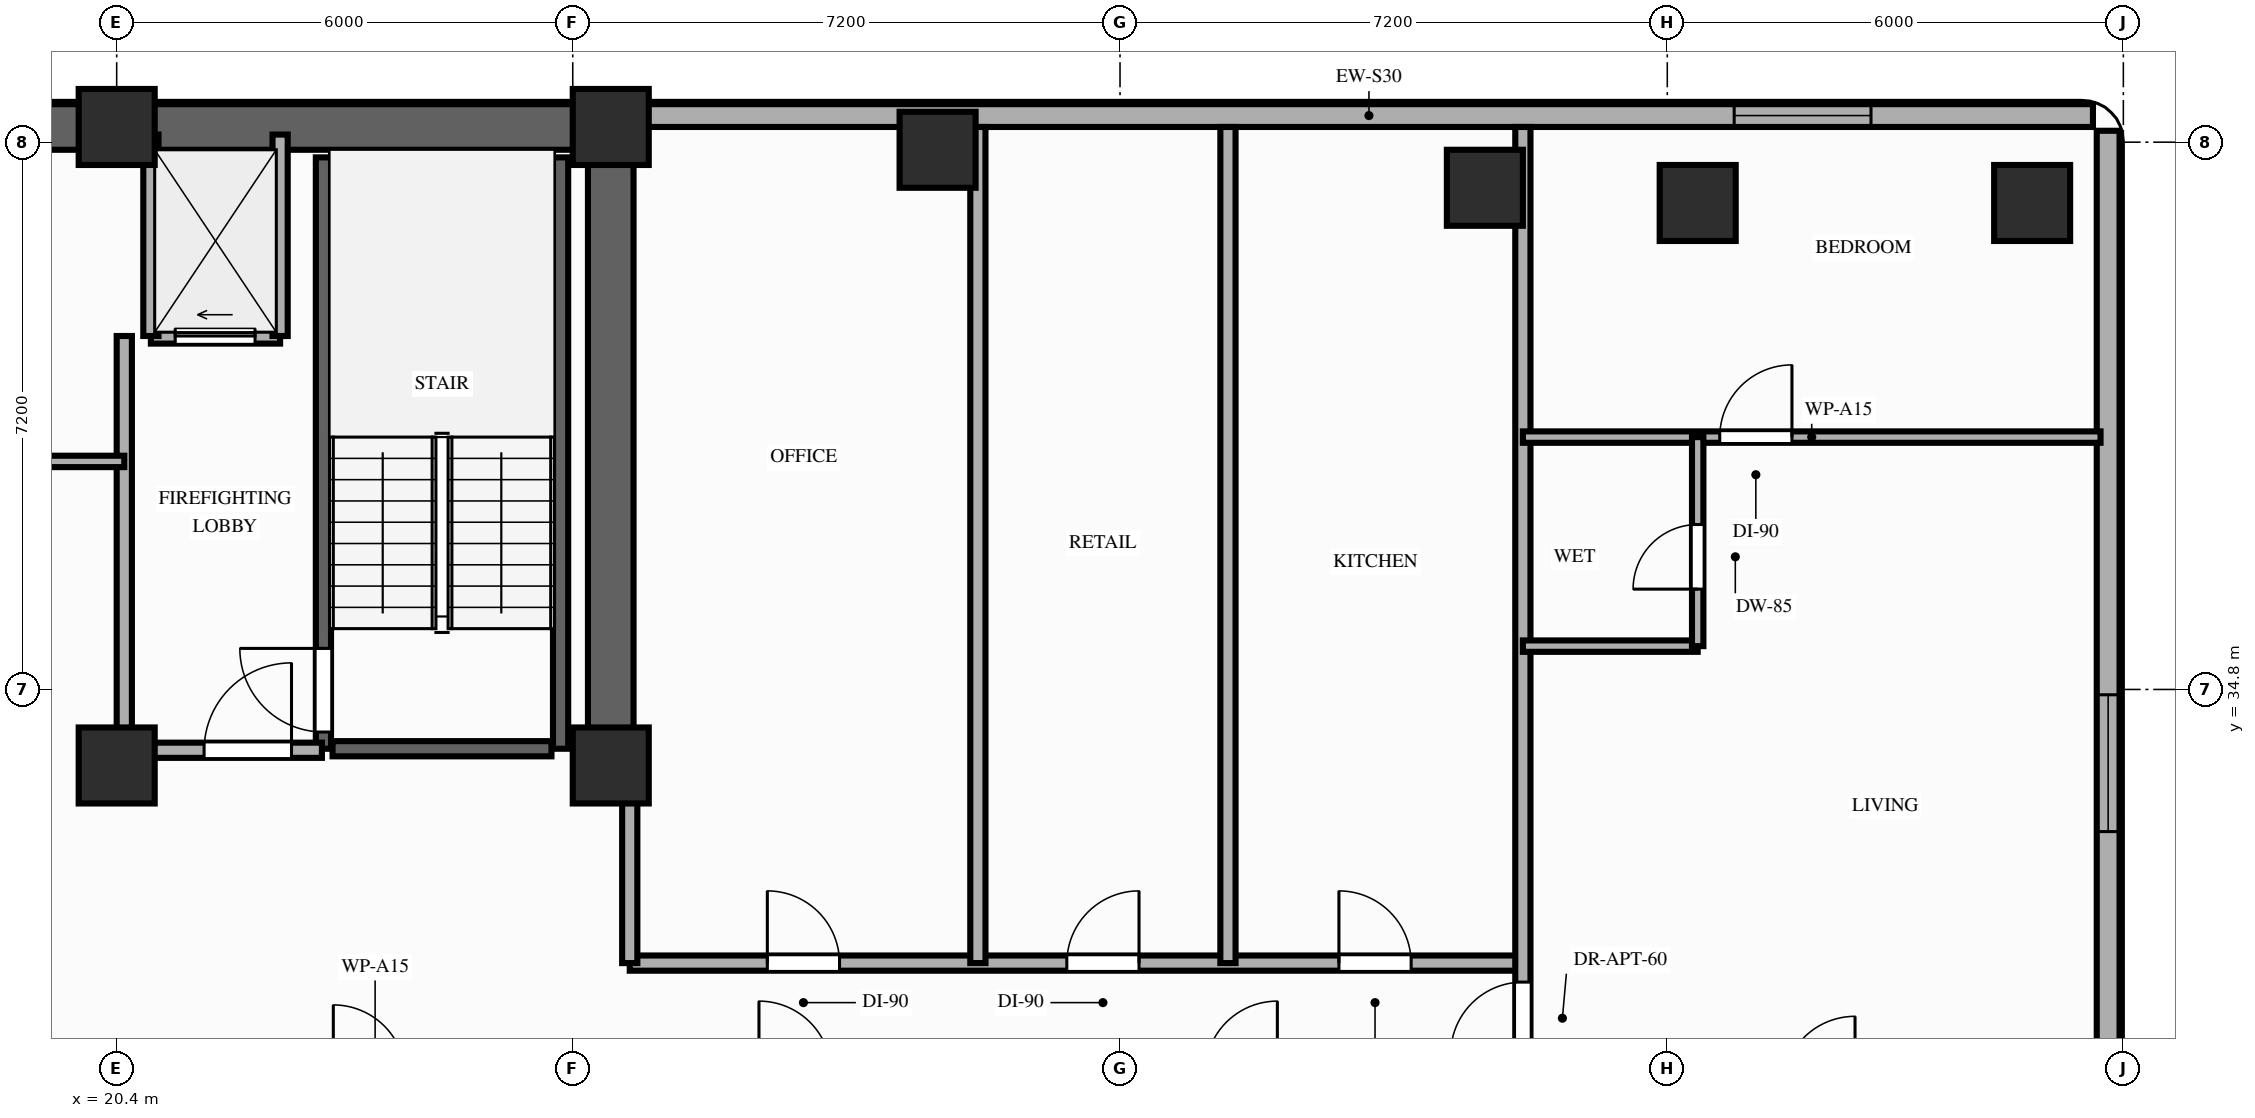
"""IFC4 building model, lengths in metres.
Left out: names, types, materials, properties, quantities, classifications, styles, units other than length and angle.
Written with IfcOpenShell. Run it as: python <this file> out.ifc"""

import sys

from ifc_helpers import new_model, si_unit, direction, frame, frame_2d, origin, origin_2d, place, context, subcontext, project, spatial, rectangle, extrude, element, fill, save


model = new_model("IFC4")
c1 = context("Model", 3, precision=1e-05, world=origin(), true_north=direction((0.0, 1.0)))
c2 = subcontext(c1, "Body", "Model", "MODEL_VIEW")
j1 = project(units=[si_unit("LENGTHUNIT", "METRE"), si_unit("PLANEANGLEUNIT", "RADIAN")], contexts=[c1])
p1 = place(None, origin())
s1 = spatial("IfcSite", under=j1, at=p1, CompositionType="ELEMENT")
p2 = place(p1, origin())
s2 = spatial("IfcBuilding", under=s1, at=p2, CompositionType="ELEMENT")
p3 = place(p2, frame((0.0, 0.0, 107.4)))
s3 = spatial("IfcBuildingStorey", under=s2, at=p3, CompositionType="ELEMENT", Elevation=107.4)
for number, where, z_axis, x_axis in (
    (1, (20.4, 33.8, 0.0), (0.0, 0.0, 1.0), (1.0, 0.0, 0.0)),
    (2, (26.9, 33.8, 0.0), (0.0, 0.0, 1.0), (1.0, 0.0, 0.0)),
    (3, (20.4, 42.2, 0.0), (0.0, 0.0, 1.0), (1.0, 0.0, 0.0)),
    (4, (26.9, 42.2, 0.0), (0.0, 0.0, 1.0), (1.0, 0.0, 0.0)),
    (5, (31.2, 41.9, 0.0), (0.0, 0.0, 1.0), (1.0, 0.0, 0.0)),
    (6, (38.4, 41.4, 0.0), (0.0, 0.0, 1.0), (1.0, 0.0, 0.0)),
    (7, (41.2, 41.2, 0.0), (0.0, 0.0, 1.0), (1.0, 0.0, 0.0)),
    (8, (45.6, 41.2, 0.0), (0.0, 0.0, 1.0), (1.0, 0.0, 0.0)),
):
    element("IfcColumn", number, at=place(p3, frame(where, z_axis=z_axis, x_axis=x_axis)), inside=s3, PredefinedType="COLUMN", context=c2, shape_type="SweptSolid", body=[
        extrude(rectangle(XDim=1.0, YDim=1.0, at=origin_2d()), origin(), (0.0, 0.0, 1.0), 3.2),
    ])
p4 = place(p3, frame((46.4, 42.35, 0.0), z_axis=(0.0, 0.0, 1.0), x_axis=(-1.0, 0.0, 0.0)))
e9 = element("IfcWall", 9, at=p4, inside=s3, PredefinedType="STANDARD", context=c2, shape_type="SweptSolid", body=[
    extrude(rectangle(XDim=19.05, YDim=0.3, at=frame_2d((9.525, 0.0))), origin(), (0.0, 0.0, 1.0), 2.41),
])
p5 = place(p4, frame((2.92, 0.0, 0.85)))
e10 = element("IfcOpeningElement", 10, at=p5, cuts=e9, PredefinedType="OPENING", context=c2, shape_type="SweptSolid", body=[
    extrude(rectangle(XDim=1.8, YDim=1.31, at=frame_2d((0.9, 0.655))), frame((0.0, 0.16, 0.0), z_axis=(0.0, -1.0, 0.0), x_axis=(1.0, 0.0, 0.0)), (0.0, 0.0, 1.0), 0.32),
])
p6 = place(p3, frame((46.6, 26.8, 0.0), z_axis=(0.0, 0.0, 1.0), x_axis=(0.0, 1.0, 0.0)))
e11 = element("IfcWall", 11, at=p6, inside=s3, PredefinedType="STANDARD", context=c2, shape_type="SweptSolid", body=[
    extrude(rectangle(XDim=15.35, YDim=0.3, at=frame_2d((7.675, 0.0))), origin(), (0.0, 0.0, 1.0), 3.02),
])
p7 = place(p6, frame((6.13, 0.0, 0.85)))
e12 = element("IfcOpeningElement", 12, at=p7, cuts=e11, PredefinedType="OPENING", context=c2, shape_type="SweptSolid", body=[
    extrude(rectangle(XDim=1.8, YDim=1.75, at=frame_2d((0.9, 0.875))), frame((0.0, 0.16, 0.0), z_axis=(0.0, -1.0, 0.0), x_axis=(1.0, 0.0, 0.0)), (0.0, 0.0, 1.0), 0.32),
])
p8 = place(p3, frame((6.45, 42.2, 0.0), z_axis=(0.0, 0.0, 1.0), x_axis=(1.0, 0.0, 0.0)))
e13 = element("IfcWall", 13, at=p8, inside=s3, PredefinedType="SHEAR", context=c2, shape_type="SweptSolid", body=[
    extrude(rectangle(XDim=20.45, YDim=0.6, at=frame_2d((10.225, 0.0))), origin(), (0.0, 0.0, 1.0), 3.02),
])
p9 = place(p3, frame((26.9, 33.8, 0.0), z_axis=(0.0, 0.0, 1.0), x_axis=(0.0, 1.0, 0.0)))
e14 = element("IfcWall", 14, at=p9, inside=s3, PredefinedType="SHEAR", context=c2, shape_type="SweptSolid", body=[
    extrude(rectangle(XDim=7.95, YDim=0.6, at=frame_2d((3.975, 0.0))), origin(), (0.0, 0.0, 1.0), 3.02),
])
p10 = place(p3, frame((23.12, 34.02, 0.0), z_axis=(0.0, 0.0, 1.0), x_axis=(0.0, 1.0, 0.0)))
e15 = element("IfcWall", 15, at=p10, inside=s3, PredefinedType="SHEAR", context=c2, shape_type="SweptSolid", body=[
    extrude(rectangle(XDim=7.78, YDim=0.2, at=frame_2d((3.89, 0.0))), origin(), (0.0, 0.0, 1.0), 3.02),
])
p11 = place(p10, frame((0.22, 0.0, 0.0)))
e16 = element("IfcOpeningElement", 16, at=p11, cuts=e15, PredefinedType="OPENING", context=c2, shape_type="SweptSolid", body=[
    extrude(rectangle(XDim=1.1, YDim=2.15, at=frame_2d((0.55, 1.075))), frame((0.0, 0.11, 0.0), z_axis=(0.0, -1.0, 0.0), x_axis=(1.0, 0.0, 0.0)), (0.0, 0.0, 1.0), 0.22),
])
p12 = place(p3, frame((26.24, 34.02, 0.0), z_axis=(0.0, 0.0, 1.0), x_axis=(0.0, 1.0, 0.0)))
e17 = element("IfcWall", 17, at=p12, inside=s3, PredefinedType="SHEAR", context=c2, shape_type="SweptSolid", body=[
    extrude(rectangle(XDim=7.78, YDim=0.2, at=frame_2d((3.89, 0.0))), origin(), (0.0, 0.0, 1.0), 3.02),
])
p13 = place(p3, frame((23.24, 34.02, 0.0), z_axis=(0.0, 0.0, 1.0), x_axis=(1.0, 0.0, 0.0)))
e18 = element("IfcWall", 18, at=p13, inside=s3, PredefinedType="SHEAR", context=c2, shape_type="SweptSolid", body=[
    extrude(rectangle(XDim=2.88, YDim=0.2, at=frame_2d((1.44, 0.0))), origin(), (0.0, 0.0, 1.0), 3.02),
])
p14 = place(p3, frame((20.85, 39.45, 0.0), z_axis=(0.0, 0.0, 1.0), x_axis=(1.0, 0.0, 0.0)))
e19 = element("IfcWall", 19, at=p14, inside=s3, PredefinedType="MOVABLE", context=c2, shape_type="SweptSolid", body=[
    extrude(rectangle(XDim=1.7, YDim=0.2, at=frame_2d((0.85, 0.0))), origin(), (0.0, 0.0, 1.0), 3.02),
])
p15 = place(p14, frame((0.32, 0.0, 0.0)))
e20 = element("IfcOpeningElement", 20, at=p15, cuts=e19, PredefinedType="OPENING", context=c2, shape_type="SweptSolid", body=[
    extrude(rectangle(XDim=1.05, YDim=2.15, at=frame_2d((0.525, 1.075))), frame((0.0, 0.11, 0.0), z_axis=(0.0, -1.0, 0.0), x_axis=(1.0, 0.0, 0.0)), (0.0, 0.0, 1.0), 0.22),
])
for number, where, z_axis, x_axis in (
    (21, (20.85, 39.45, 0.0), (0.0, 0.0, 1.0), (0.0, 1.0, 0.0)),
    (22, (22.55, 39.45, 0.0), (0.0, 0.0, 1.0), (0.0, 1.0, 0.0)),
):
    element("IfcWall", number, at=place(p3, frame(where, z_axis=z_axis, x_axis=x_axis)), inside=s3, PredefinedType="MOVABLE", context=c2, shape_type="SweptSolid", body=[
        extrude(rectangle(XDim=2.65, YDim=0.2, at=frame_2d((1.325, 0.0))), origin(), (0.0, 0.0, 1.0), 2.41),
    ])
p16 = place(p3, frame((20.5, 34.0, 0.0), z_axis=(0.0, 0.0, 1.0), x_axis=(0.0, 1.0, 0.0)))
e23 = element("IfcWall", 23, at=p16, inside=s3, PredefinedType="PARTITIONING", context=c2, shape_type="SweptSolid", body=[
    extrude(rectangle(XDim=5.45, YDim=0.2, at=frame_2d((2.725, 0.0))), origin(), (0.0, 0.0, 1.0), 2.41),
])
p17 = place(p3, frame((20.5, 34.0, 0.0), z_axis=(0.0, 0.0, 1.0), x_axis=(1.0, 0.0, 0.0)))
e24 = element("IfcWall", 24, at=p17, inside=s3, PredefinedType="PARTITIONING", context=c2, shape_type="SweptSolid", body=[
    extrude(rectangle(XDim=2.6, YDim=0.2, at=frame_2d((1.3, 0.0))), origin(), (0.0, 0.0, 1.0), 2.41),
])
p18 = place(p17, frame((1.05, 0.0, 0.0)))
e25 = element("IfcOpeningElement", 25, at=p18, cuts=e24, PredefinedType="OPENING", context=c2, shape_type="SweptSolid", body=[
    extrude(rectangle(XDim=1.15, YDim=2.15, at=frame_2d((0.575, 1.075))), frame((0.0, 0.11, 0.0), z_axis=(0.0, -1.0, 0.0), x_axis=(1.0, 0.0, 0.0)), (0.0, 0.0, 1.0), 0.22),
])
p19 = place(p3, frame((12.9, 37.8, 0.0), z_axis=(0.0, 0.0, 1.0), x_axis=(1.0, 0.0, 0.0)))
e26 = element("IfcWall", 26, at=p19, inside=s3, PredefinedType="PARTITIONING", context=c2, shape_type="SweptSolid", body=[
    extrude(rectangle(XDim=7.6, YDim=0.15, at=frame_2d((3.8, 0.0))), origin(), (0.0, 0.0, 1.0), 3.02),
])
p20 = place(p19, frame((3.2, 0.0, 0.0)))
e27 = element("IfcOpeningElement", 27, at=p20, cuts=e26, PredefinedType="OPENING", context=c2, shape_type="SweptSolid", body=[
    extrude(rectangle(XDim=1.0, YDim=2.15, at=frame_2d((0.5, 1.075))), frame((0.0, 0.085, 0.0), z_axis=(0.0, -1.0, 0.0), x_axis=(1.0, 0.0, 0.0)), (0.0, 0.0, 1.0), 0.17),
])
p21 = place(p3, frame((27.15, 31.2, 0.0), z_axis=(0.0, 0.0, 1.0), x_axis=(1.0, 0.0, 0.0)))
e28 = element("IfcWall", 28, at=p21, inside=s3, PredefinedType="PARTITIONING", context=c2, shape_type="SweptSolid", body=[
    extrude(rectangle(XDim=11.75, YDim=0.2, at=frame_2d((5.875, 0.0))), origin(), (0.0, 0.0, 1.0), 2.41),
])
p22 = place(p21, frame((1.81, 0.0, 0.0)))
e29 = element("IfcOpeningElement", 29, at=p22, cuts=e28, PredefinedType="OPENING", context=c2, shape_type="SweptSolid", body=[
    extrude(rectangle(XDim=0.95, YDim=2.15, at=frame_2d((0.475, 1.075))), frame((0.0, 0.11, 0.0), z_axis=(0.0, -1.0, 0.0), x_axis=(1.0, 0.0, 0.0)), (0.0, 0.0, 1.0), 0.22),
])
p23 = place(p21, frame((5.75, 0.0, 0.0)))
e30 = element("IfcOpeningElement", 30, at=p23, cuts=e28, PredefinedType="OPENING", context=c2, shape_type="SweptSolid", body=[
    extrude(rectangle(XDim=0.95, YDim=2.15, at=frame_2d((0.475, 1.075))), frame((0.0, 0.11, 0.0), z_axis=(0.0, -1.0, 0.0), x_axis=(1.0, 0.0, 0.0)), (0.0, 0.0, 1.0), 0.22),
])
p24 = place(p21, frame((9.33, 0.0, 0.0)))
e31 = element("IfcOpeningElement", 31, at=p24, cuts=e28, PredefinedType="OPENING", context=c2, shape_type="SweptSolid", body=[
    extrude(rectangle(XDim=0.95, YDim=2.15, at=frame_2d((0.475, 1.075))), frame((0.0, 0.11, 0.0), z_axis=(0.0, -1.0, 0.0), x_axis=(1.0, 0.0, 0.0)), (0.0, 0.0, 1.0), 0.22),
])
p25 = place(p3, frame((27.15, 31.2, 0.0), z_axis=(0.0, 0.0, 1.0), x_axis=(0.0, 1.0, 0.0)))
e32 = element("IfcWall", 32, at=p25, inside=s3, PredefinedType="PARTITIONING", context=c2, shape_type="SweptSolid", body=[
    extrude(rectangle(XDim=2.48, YDim=0.2, at=frame_2d((1.24, 0.0))), origin(), (0.0, 0.0, 1.0), 2.41),
])
p26 = place(p3, frame((38.9, 26.75, 0.0), z_axis=(0.0, 0.0, 1.0), x_axis=(0.0, 1.0, 0.0)))
e33 = element("IfcWall", 33, at=p26, inside=s3, PredefinedType="PARTITIONING", context=c2, shape_type="SweptSolid", body=[
    extrude(rectangle(XDim=15.45, YDim=0.2, at=frame_2d((7.725, 0.0))), origin(), (0.0, 0.0, 1.0), 2.41),
])
p27 = place(p26, frame((3.25, 0.0, 0.0)))
e34 = element("IfcOpeningElement", 34, at=p27, cuts=e33, PredefinedType="OPENING", context=c2, shape_type="SweptSolid", body=[
    extrude(rectangle(XDim=0.95, YDim=2.15, at=frame_2d((0.475, 1.075))), frame((0.0, 0.11, 0.0), z_axis=(0.0, -1.0, 0.0), x_axis=(1.0, 0.0, 0.0)), (0.0, 0.0, 1.0), 0.22),
])
p28 = place(p3, frame((38.9, 38.12, 0.0), z_axis=(0.0, 0.0, 1.0), x_axis=(1.0, 0.0, 0.0)))
e35 = element("IfcWall", 35, at=p28, inside=s3, PredefinedType="PARTITIONING", context=c2, shape_type="SweptSolid", body=[
    extrude(rectangle(XDim=7.6, YDim=0.15, at=frame_2d((3.8, 0.0))), origin(), (0.0, 0.0, 1.0), 2.41),
])
p29 = place(p28, frame((2.59, 0.0, 0.0)))
e36 = element("IfcOpeningElement", 36, at=p29, cuts=e35, PredefinedType="OPENING", context=c2, shape_type="SweptSolid", body=[
    extrude(rectangle(XDim=0.95, YDim=2.15, at=frame_2d((0.475, 1.075))), frame((0.0, 0.085, 0.0), z_axis=(0.0, -1.0, 0.0), x_axis=(1.0, 0.0, 0.0)), (0.0, 0.0, 1.0), 0.17),
])
p30 = place(p3, frame((38.9, 35.37, 0.0), z_axis=(0.0, 0.0, 1.0), x_axis=(1.0, 0.0, 0.0)))
e37 = element("IfcWall", 37, at=p30, inside=s3, PredefinedType="PARTITIONING", context=c2, shape_type="SweptSolid", body=[
    extrude(rectangle(XDim=2.3, YDim=0.15, at=frame_2d((1.15, 0.0))), origin(), (0.0, 0.0, 1.0), 2.41),
])
p31 = place(p3, frame((41.2, 35.37, 0.0), z_axis=(0.0, 0.0, 1.0), x_axis=(0.0, 1.0, 0.0)))
e38 = element("IfcWall", 38, at=p31, inside=s3, PredefinedType="PARTITIONING", context=c2, shape_type="SweptSolid", body=[
    extrude(rectangle(XDim=2.75, YDim=0.15, at=frame_2d((1.375, 0.0))), origin(), (0.0, 0.0, 1.0), 2.41),
])
p32 = place(p31, frame((0.75, 0.0, 0.0)))
e39 = element("IfcOpeningElement", 39, at=p32, cuts=e38, PredefinedType="OPENING", context=c2, shape_type="SweptSolid", body=[
    extrude(rectangle(XDim=0.85, YDim=2.1, at=frame_2d((0.425, 1.05))), frame((0.0, 0.085, 0.0), z_axis=(0.0, -1.0, 0.0), x_axis=(1.0, 0.0, 0.0)), (0.0, 0.0, 1.0), 0.17),
])
for number, where, z_axis, x_axis in (
    (40, (31.73, 31.2, 0.0), (0.0, 0.0, 1.0), (0.0, 1.0, 0.0)),
    (41, (35.02, 31.2, 0.0), (0.0, 0.0, 1.0), (0.0, 1.0, 0.0)),
):
    element("IfcWall", number, at=place(p3, frame(where, z_axis=z_axis, x_axis=x_axis)), inside=s3, PredefinedType="PARTITIONING", context=c2, shape_type="SweptSolid", body=[
        extrude(rectangle(XDim=11.0, YDim=0.2, at=frame_2d((5.5, 0.0))), origin(), (0.0, 0.0, 1.0), 2.41),
    ])
p33 = place(p7, origin())
e42 = element("IfcWindow", 42, at=p33, inside=s3, PartitioningType="SINGLE_PANEL", PredefinedType="WINDOW", context=c2, shape_type="SweptSolid", body=[
    extrude(rectangle(XDim=1.8, YDim=1.75, at=frame_2d((0.9, 0.875))), frame((0.0, 0.03, 0.0), z_axis=(0.0, -1.0, 0.0), x_axis=(1.0, 0.0, 0.0)), (0.0, 0.0, 1.0), 0.06),
])
fill(e12, e42)
p34 = place(p5, origin())
e43 = element("IfcWindow", 43, at=p34, inside=s3, PartitioningType="SINGLE_PANEL", PredefinedType="WINDOW", context=c2, shape_type="SweptSolid", body=[
    extrude(rectangle(XDim=1.8, YDim=1.31, at=frame_2d((0.9, 0.655))), frame((0.0, 0.03, 0.0), z_axis=(0.0, -1.0, 0.0), x_axis=(1.0, 0.0, 0.0)), (0.0, 0.0, 1.0), 0.06),
])
fill(e10, e43)
p35 = place(p11, origin())
e44 = element("IfcDoor", 44, at=p35, inside=s3, OperationType="SINGLE_SWING_RIGHT", PredefinedType="DOOR", context=c2, shape_type="SweptSolid", body=[
    extrude(rectangle(XDim=1.1, YDim=2.15, at=frame_2d((0.55, 1.075))), frame((0.0, 0.025, 0.0), z_axis=(0.0, -1.0, 0.0), x_axis=(1.0, 0.0, 0.0)), (0.0, 0.0, 1.0), 0.05),
])
fill(e16, e44)
p36 = place(p15, origin())
e45 = element("IfcDoor", 45, at=p36, inside=s3, OperationType="SLIDING_TO_LEFT", PredefinedType="DOOR", context=c2, shape_type="SweptSolid", body=[
    extrude(rectangle(XDim=1.05, YDim=2.15, at=frame_2d((0.525, 1.075))), frame((0.0, 0.025, 0.0), z_axis=(0.0, -1.0, 0.0), x_axis=(1.0, 0.0, 0.0)), (0.0, 0.0, 1.0), 0.05),
])
fill(e20, e45)
p37 = place(p18, origin())
e46 = element("IfcDoor", 46, at=p37, inside=s3, OperationType="SINGLE_SWING_RIGHT", PredefinedType="DOOR", context=c2, shape_type="SweptSolid", body=[
    extrude(rectangle(XDim=1.15, YDim=2.15, at=frame_2d((0.575, 1.075))), frame((0.0, 0.025, 0.0), z_axis=(0.0, -1.0, 0.0), x_axis=(1.0, 0.0, 0.0)), (0.0, 0.0, 1.0), 0.05),
])
fill(e25, e46)
p38 = place(p27, origin())
e47 = element("IfcDoor", 47, at=p38, inside=s3, OperationType="SINGLE_SWING_LEFT", PredefinedType="DOOR", context=c2, shape_type="SweptSolid", body=[
    extrude(rectangle(XDim=0.95, YDim=2.15, at=frame_2d((0.475, 1.075))), frame((0.0, 0.025, 0.0), z_axis=(0.0, -1.0, 0.0), x_axis=(1.0, 0.0, 0.0)), (0.0, 0.0, 1.0), 0.05),
])
fill(e34, e47)
p39 = place(p29, origin())
e48 = element("IfcDoor", 48, at=p39, inside=s3, OperationType="SINGLE_SWING_RIGHT", PredefinedType="DOOR", context=c2, shape_type="SweptSolid", body=[
    extrude(rectangle(XDim=0.95, YDim=2.15, at=frame_2d((0.475, 1.075))), frame((0.0, 0.025, 0.0), z_axis=(0.0, -1.0, 0.0), x_axis=(1.0, 0.0, 0.0)), (0.0, 0.0, 1.0), 0.05),
])
fill(e36, e48)
p40 = place(p32, origin())
e49 = element("IfcDoor", 49, at=p40, inside=s3, OperationType="SINGLE_SWING_LEFT", PredefinedType="DOOR", context=c2, shape_type="SweptSolid", body=[
    extrude(rectangle(XDim=0.85, YDim=2.1, at=frame_2d((0.425, 1.05))), frame((0.0, 0.025, 0.0), z_axis=(0.0, -1.0, 0.0), x_axis=(1.0, 0.0, 0.0)), (0.0, 0.0, 1.0), 0.05),
])
fill(e39, e49)
p41 = place(p22, origin())
e50 = element("IfcDoor", 50, at=p41, inside=s3, OperationType="SINGLE_SWING_LEFT", PredefinedType="DOOR", context=c2, shape_type="SweptSolid", body=[
    extrude(rectangle(XDim=0.95, YDim=2.15, at=frame_2d((0.475, 1.075))), frame((0.0, 0.025, 0.0), z_axis=(0.0, -1.0, 0.0), x_axis=(1.0, 0.0, 0.0)), (0.0, 0.0, 1.0), 0.05),
])
fill(e29, e50)
p42 = place(p23, origin())
e51 = element("IfcDoor", 51, at=p42, inside=s3, OperationType="SINGLE_SWING_RIGHT", PredefinedType="DOOR", context=c2, shape_type="SweptSolid", body=[
    extrude(rectangle(XDim=0.95, YDim=2.15, at=frame_2d((0.475, 1.075))), frame((0.0, 0.025, 0.0), z_axis=(0.0, -1.0, 0.0), x_axis=(1.0, 0.0, 0.0)), (0.0, 0.0, 1.0), 0.05),
])
fill(e30, e51)
p43 = place(p24, origin())
e52 = element("IfcDoor", 52, at=p43, inside=s3, OperationType="SINGLE_SWING_LEFT", PredefinedType="DOOR", context=c2, shape_type="SweptSolid", body=[
    extrude(rectangle(XDim=0.95, YDim=2.15, at=frame_2d((0.475, 1.075))), frame((0.0, 0.025, 0.0), z_axis=(0.0, -1.0, 0.0), x_axis=(1.0, 0.0, 0.0)), (0.0, 0.0, 1.0), 0.05),
])
fill(e31, e52)
save(model, sys.argv[1])
